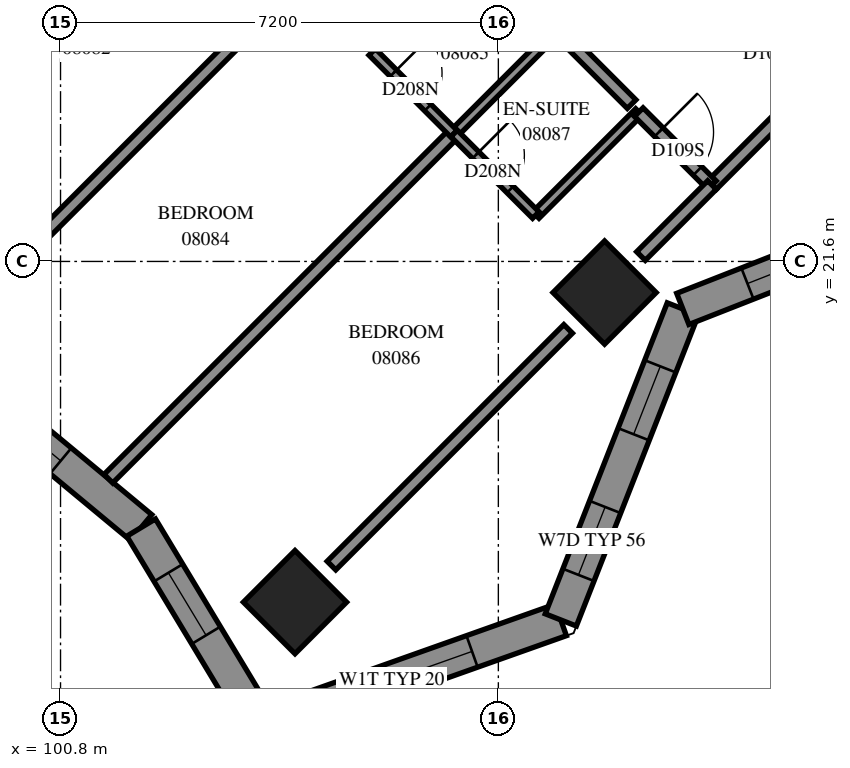
"""IFC4 building model, lengths in metres.
Left out: names, types, materials, properties, quantities, classifications, styles, units other than length and angle.
Written with IfcOpenShell. Run it as: python <this file> out.ifc"""

import sys

from ifc_helpers import new_model, si_unit, direction, frame, frame_2d, origin, origin_2d, place, context, subcontext, project, spatial, polyline, rectangle, outline, extrude, element, fill, save


model = new_model("IFC4")
c1 = context("Model", 3, precision=1e-05, world=origin(), true_north=direction((0.0, 1.0)))
c2 = subcontext(c1, "Body", "Model", "MODEL_VIEW")
j1 = project(units=[si_unit("LENGTHUNIT", "METRE"), si_unit("PLANEANGLEUNIT", "RADIAN")], contexts=[c1])
p1 = place(None, origin())
s1 = spatial("IfcSite", under=j1, at=p1, CompositionType="ELEMENT")
p2 = place(p1, origin())
s2 = spatial("IfcBuilding", under=s1, at=p2, CompositionType="ELEMENT")
p3 = place(p2, frame((0.0, 0.0, 33.8)))
s3 = spatial("IfcBuildingStorey", under=s2, at=p3, CompositionType="ELEMENT", Elevation=33.8)
for number, where, z_axis, x_axis in (
    (1, (109.747, 21.088, 0.0), (0.0, 0.0, 1.0), (0.707, -0.707, 0.0)),
    (2, (104.656, 15.997, 0.0), (0.0, 0.0, 1.0), (0.707, -0.707, 0.0)),
):
    element("IfcColumn", number, at=place(p3, frame(where, z_axis=z_axis, x_axis=x_axis)), inside=s3, PredefinedType="COLUMN", context=c2, shape_type="SweptSolid", body=[
        extrude(rectangle(XDim=1.2, YDim=1.2, at=origin_2d()), origin(), (0.0, 0.0, 1.0), 3.1),
    ])
p4 = place(p3, frame((104.096, 13.955, 0.0), z_axis=(0.0, 0.0, 1.0), x_axis=(0.9424205564, 0.3344301046, 0.0)))
e3 = element("IfcWall", 3, at=p4, inside=s3, PredefinedType="SOLIDWALL", context=c2, shape_type="SweptSolid", body=[
    extrude(outline(polyline([(-0.225, -0.275), (5.358, -0.275), (5.107, 0.275), (0.225, 0.275), (-0.225, -0.275)])), origin(), (0.0, 0.0, 1.0), 3.1),
])
p5 = place(p4, frame((0.884, 0.0, 0.5)))
e4 = element("IfcOpeningElement", 4, at=p5, cuts=e3, PredefinedType="OPENING", context=c2, shape_type="SweptSolid", body=[
    extrude(rectangle(XDim=2.8, YDim=2.45, at=frame_2d((1.4, 1.225))), frame((0.0, 0.285, 0.0), z_axis=(0.0, -1.0, 0.0), x_axis=(1.0, 0.0, 0.0)), (0.0, 0.0, 1.0), 0.57),
])
p6 = place(p3, frame((109.027, 15.705, 0.0), z_axis=(0.0, 0.0, 1.0), x_axis=(0.3651939331, 0.9309314643, 0.0)))
e5 = element("IfcWall", 5, at=p6, inside=s3, PredefinedType="SOLIDWALL", context=c2, shape_type="SweptSolid", body=[
    extrude(outline(polyline([(-0.125, -0.275), (5.374, -0.275), (5.614, 0.275), (0.125, 0.275), (-0.125, -0.275)])), origin(), (0.0, 0.0, 1.0), 3.1),
])
p7 = place(p6, frame((0.795, 0.0, 0.5)))
e6 = element("IfcOpeningElement", 6, at=p7, cuts=e5, PredefinedType="OPENING", context=c2, shape_type="SweptSolid", body=[
    extrude(rectangle(XDim=1.2, YDim=2.45, at=frame_2d((0.6, 1.225))), frame((0.0, 0.285, 0.0), z_axis=(0.0, -1.0, 0.0), x_axis=(1.0, 0.0, 0.0)), (0.0, 0.0, 1.0), 0.57),
])
p8 = place(p6, frame((3.28, 0.0, 0.5)))
e7 = element("IfcOpeningElement", 7, at=p8, cuts=e5, PredefinedType="OPENING", context=c2, shape_type="SweptSolid", body=[
    extrude(rectangle(XDim=1.2, YDim=2.45, at=frame_2d((0.6, 1.225))), frame((0.0, 0.285, 0.0), z_axis=(0.0, -1.0, 0.0), x_axis=(1.0, 0.0, 0.0)), (0.0, 0.0, 1.0), 0.57),
])
p9 = place(p3, frame((111.034, 20.819, 0.0), z_axis=(0.0, 0.0, 1.0), x_axis=(0.9309376522, 0.3651781589, 0.0)))
e8 = element("IfcWall", 8, at=p9, inside=s3, PredefinedType="SOLIDWALL", context=c2, shape_type="SweptSolid", body=[
    extrude(outline(polyline([(0.12, -0.275), (5.62, -0.275), (5.369, 0.275), (-0.12, 0.275), (0.12, -0.275)])), origin(), (0.0, 0.0, 1.0), 3.1),
])
p10 = place(p9, frame((1.142, 0.0, 0.5)))
e9 = element("IfcOpeningElement", 9, at=p10, cuts=e8, PredefinedType="OPENING", context=c2, shape_type="SweptSolid", body=[
    extrude(rectangle(XDim=2.8, YDim=2.45, at=frame_2d((1.4, 1.225))), frame((0.0, 0.285, 0.0), z_axis=(0.0, -1.0, 0.0), x_axis=(1.0, 0.0, 0.0)), (0.0, 0.0, 1.0), 0.57),
])
p11 = place(p3, frame((99.112, 19.724, 0.0), z_axis=(0.0, 0.0, 1.0), x_axis=(0.7696116293, -0.6385122866, 0.0)))
e10 = element("IfcWall", 10, at=p11, inside=s3, PredefinedType="SOLIDWALL", context=c2, shape_type="SweptSolid", body=[
    extrude(outline(polyline([(-0.026, -0.275), (3.869, -0.275), (3.962, 0.275), (0.026, 0.275), (-0.026, -0.275)])), origin(), (0.0, 0.0, 1.0), 3.1),
])
p12 = place(p11, frame((0.997, 0.0, 0.5)))
e11 = element("IfcOpeningElement", 11, at=p12, cuts=e10, PredefinedType="OPENING", context=c2, shape_type="SweptSolid", body=[
    extrude(rectangle(XDim=1.2, YDim=2.45, at=frame_2d((0.6, 1.225))), frame((0.0, 0.285, 0.0), z_axis=(0.0, -1.0, 0.0), x_axis=(1.0, 0.0, 0.0)), (0.0, 0.0, 1.0), 0.57),
])
p13 = place(p3, frame((102.125, 17.224, 0.0), z_axis=(0.0, 0.0, 1.0), x_axis=(0.5162476894, -0.8564393284, 0.0)))
e12 = element("IfcWall", 12, at=p13, inside=s3, PredefinedType="SOLIDWALL", context=c2, shape_type="SweptSolid", body=[
    extrude(outline(polyline([(0.047, -0.275), (4.042, -0.275), (3.592, 0.275), (-0.047, 0.275), (0.047, -0.275)])), origin(), (0.0, 0.0, 1.0), 3.1),
])
p14 = place(p13, frame((0.869, 0.0, 0.5)))
e13 = element("IfcOpeningElement", 13, at=p14, cuts=e12, PredefinedType="OPENING", context=c2, shape_type="SweptSolid", body=[
    extrude(rectangle(XDim=1.2, YDim=2.45, at=frame_2d((0.6, 1.225))), frame((0.0, 0.285, 0.0), z_axis=(0.0, -1.0, 0.0), x_axis=(1.0, 0.0, 0.0)), (0.0, 0.0, 1.0), 0.57),
])
p15 = place(p3, frame((102.609, 31.769, 0.0), z_axis=(0.0, 0.0, 1.0), x_axis=(0.7071067812, -0.7071067812, 0.0)))
e14 = element("IfcWall", 14, at=p15, inside=s3, PredefinedType="PARTITIONING", context=c2, shape_type="SweptSolid", body=[
    extrude(rectangle(XDim=10.723, YDim=0.2, at=frame_2d((5.361, 0.0))), origin(), (0.0, 0.0, 1.0), 3.1),
])
p16 = place(p15, frame((4.15, 0.0, 0.0)))
e15 = element("IfcOpeningElement", 15, at=p16, cuts=e14, PredefinedType="OPENING", context=c2, shape_type="SweptSolid", body=[
    extrude(rectangle(XDim=0.9, YDim=2.1, at=frame_2d((0.45, 1.05))), frame((0.0, 0.11, 0.0), z_axis=(0.0, -1.0, 0.0), x_axis=(1.0, 0.0, 0.0)), (0.0, 0.0, 1.0), 0.22),
])
p17 = place(p15, frame((5.8, 0.0, 0.0)))
e16 = element("IfcOpeningElement", 16, at=p17, cuts=e14, PredefinedType="OPENING", context=c2, shape_type="SweptSolid", body=[
    extrude(rectangle(XDim=0.9, YDim=2.1, at=frame_2d((0.45, 1.05))), frame((0.0, 0.11, 0.0), z_axis=(0.0, -1.0, 0.0), x_axis=(1.0, 0.0, 0.0)), (0.0, 0.0, 1.0), 0.22),
])
p18 = place(p3, frame((101.587, 18.028, 0.0), z_axis=(0.0, 0.0, 1.0), x_axis=(0.7072374716, 0.7069760666, 0.0)))
e17 = element("IfcWall", 17, at=p18, inside=s3, PredefinedType="PARTITIONING", context=c2, shape_type="SweptSolid", body=[
    extrude(rectangle(XDim=8.034, YDim=0.2, at=frame_2d((4.017, 0.0))), origin(), (0.0, 0.0, 1.0), 3.1),
])
p19 = place(p3, frame((96.536, 23.152, 0.0), z_axis=(0.0, 0.0, 1.0), x_axis=(0.7071067812, 0.7071067812, 0.0)))
e18 = element("IfcWall", 18, at=p19, inside=s3, PredefinedType="PARTITIONING", context=c2, shape_type="SweptSolid", body=[
    extrude(rectangle(XDim=7.983, YDim=0.2, at=frame_2d((3.991, 0.0))), origin(), (0.0, 0.0, 1.0), 3.1),
])
p20 = place(p3, frame((107.977, 29.499, 0.0), z_axis=(0.0, 0.0, 1.0), x_axis=(0.7071067812, -0.7071067812, 0.0)))
e19 = element("IfcWall", 19, at=p20, inside=s3, PredefinedType="PARTITIONING", context=c2, shape_type="SweptSolid", body=[
    extrude(rectangle(XDim=7.198, YDim=0.2, at=frame_2d((3.599, 0.0))), origin(), (0.0, 0.0, 1.0), 3.1),
])
p21 = place(p20, frame((0.247, 0.0, 0.0)))
e20 = element("IfcOpeningElement", 20, at=p21, cuts=e19, PredefinedType="OPENING", context=c2, shape_type="SweptSolid", body=[
    extrude(rectangle(XDim=0.9, YDim=2.1, at=frame_2d((0.45, 1.05))), frame((0.0, 0.11, 0.0), z_axis=(0.0, -1.0, 0.0), x_axis=(1.0, 0.0, 0.0)), (0.0, 0.0, 1.0), 0.22),
])
p22 = place(p20, frame((5.899, 0.0, 0.0)))
e21 = element("IfcOpeningElement", 21, at=p22, cuts=e19, PredefinedType="OPENING", context=c2, shape_type="SweptSolid", body=[
    extrude(rectangle(XDim=0.9, YDim=2.1, at=frame_2d((0.45, 1.05))), frame((0.0, 0.11, 0.0), z_axis=(0.0, -1.0, 0.0), x_axis=(1.0, 0.0, 0.0)), (0.0, 0.0, 1.0), 0.22),
])
p23 = place(p3, frame((105.255, 16.599, 0.0), z_axis=(0.0, 0.0, 1.0), x_axis=(0.7071067812, 0.7071067812, 0.0)))
e22 = element("IfcWall", 22, at=p23, inside=s3, PredefinedType="PARTITIONING", context=c2, shape_type="SweptSolid", body=[
    extrude(rectangle(XDim=5.504, YDim=0.2, at=frame_2d((2.752, 0.0))), origin(), (0.0, 0.0, 1.0), 2.6),
])
p24 = place(p3, frame((100.163, 21.689, 0.0), z_axis=(0.0, 0.0, 1.0), x_axis=(0.7071067812, 0.7071067812, 0.0)))
e23 = element("IfcWall", 23, at=p24, inside=s3, PredefinedType="PARTITIONING", context=c2, shape_type="SweptSolid", body=[
    extrude(rectangle(XDim=5.504, YDim=0.2, at=frame_2d((2.752, 0.0))), origin(), (0.0, 0.0, 1.0), 3.1),
])
for number, where, z_axis, x_axis in (
    (24, (105.927, 25.049, 0.0), (0.0, 0.0, 1.0), (0.707, 0.707, 0.0)),
    (25, (107.271, 23.705, 0.0), (0.0, 0.0, 1.0), (0.707, 0.707, 0.0)),
):
    element("IfcWall", number, at=place(p3, frame(where, z_axis=z_axis, x_axis=x_axis)), inside=s3, PredefinedType="PARTITIONING", context=c2, shape_type="SweptSolid", body=[
        extrude(rectangle(XDim=2.401, YDim=0.15, at=frame_2d((1.201, 0.0))), origin(), (0.0, 0.0, 1.0), 3.1),
    ])
p25 = place(p3, frame((108.615, 22.363, 0.0), z_axis=(0.0, 0.0, 1.0), x_axis=(0.7071067812, 0.7071067812, 0.0)))
e26 = element("IfcWall", 26, at=p25, inside=s3, PredefinedType="PARTITIONING", context=c2, shape_type="SweptSolid", body=[
    extrude(rectangle(XDim=2.398, YDim=0.15, at=frame_2d((1.199, 0.0))), origin(), (0.0, 0.0, 1.0), 3.1),
])
p26 = place(p3, frame((111.513, 22.857, 0.0), z_axis=(0.0, 0.0, 1.0), x_axis=(0.7071067812, 0.7071067812, 0.0)))
e27 = element("IfcWall", 27, at=p26, inside=s3, PredefinedType="PARTITIONING", context=c2, shape_type="SweptSolid", body=[
    extrude(rectangle(XDim=2.2, YDim=0.2, at=frame_2d((1.1, 0.0))), origin(), (0.0, 0.0, 1.0), 2.6),
])
p27 = place(p3, frame((105.925, 25.045, 0.0), z_axis=(0.0, 0.0, 1.0), x_axis=(0.7071067812, -0.7071067812, 0.0)))
e28 = element("IfcWall", 28, at=p27, inside=s3, PredefinedType="PARTITIONING", context=c2, shape_type="SweptSolid", body=[
    extrude(rectangle(XDim=1.901, YDim=0.15, at=frame_2d((0.95, 0.0))), origin(), (0.0, 0.0, 1.0), 3.1),
])
p28 = place(p27, frame((0.493, 0.0, 0.0)))
e29 = element("IfcOpeningElement", 29, at=p28, cuts=e28, PredefinedType="OPENING", context=c2, shape_type="SweptSolid", body=[
    extrude(rectangle(XDim=0.8, YDim=2.1, at=frame_2d((0.4, 1.05))), frame((0.0, 0.085, 0.0), z_axis=(0.0, -1.0, 0.0), x_axis=(1.0, 0.0, 0.0)), (0.0, 0.0, 1.0), 0.17),
])
p29 = place(p3, frame((107.272, 23.704, 0.0), z_axis=(0.0, 0.0, 1.0), x_axis=(0.7076330979, -0.7065800724, 0.0)))
e30 = element("IfcWall", 30, at=p29, inside=s3, PredefinedType="PARTITIONING", context=c2, shape_type="SweptSolid", body=[
    extrude(rectangle(XDim=1.899, YDim=0.15, at=frame_2d((0.95, 0.0))), origin(), (0.0, 0.0, 1.0), 3.1),
])
p30 = place(p29, frame((0.503, 0.0, 0.0)))
e31 = element("IfcOpeningElement", 31, at=p30, cuts=e30, PredefinedType="OPENING", context=c2, shape_type="SweptSolid", body=[
    extrude(rectangle(XDim=0.8, YDim=2.1, at=frame_2d((0.4, 1.05))), frame((0.0, 0.085, 0.0), z_axis=(0.0, -1.0, 0.0), x_axis=(1.0, 0.0, 0.0)), (0.0, 0.0, 1.0), 0.17),
])
p31 = place(p3, frame((110.309, 24.055, 0.0), z_axis=(0.0, 0.0, 1.0), x_axis=(0.7071067812, -0.7071067812, 0.0)))
e32 = element("IfcWall", 32, at=p31, inside=s3, PredefinedType="PARTITIONING", context=c2, shape_type="SweptSolid", body=[
    extrude(rectangle(XDim=1.7, YDim=0.2, at=frame_2d((0.85, 0.0))), origin(), (0.0, 0.0, 1.0), 3.1),
])
p32 = place(p31, frame((0.467, 0.0, 0.0)))
e33 = element("IfcOpeningElement", 33, at=p32, cuts=e32, PredefinedType="OPENING", context=c2, shape_type="SweptSolid", body=[
    extrude(rectangle(XDim=0.9, YDim=2.1, at=frame_2d((0.45, 1.05))), frame((0.0, 0.11, 0.0), z_axis=(0.0, -1.0, 0.0), x_axis=(1.0, 0.0, 0.0)), (0.0, 0.0, 1.0), 0.22),
])
p33 = place(p3, frame((110.346, 21.689, 0.0), z_axis=(0.0, 0.0, 1.0), x_axis=(0.7071067812, 0.7071067812, 0.0)))
e34 = element("IfcWall", 34, at=p33, inside=s3, PredefinedType="PARTITIONING", context=c2, shape_type="SweptSolid", body=[
    extrude(rectangle(XDim=1.652, YDim=0.2, at=frame_2d((0.826, 0.0))), origin(), (0.0, 0.0, 1.0), 2.6),
])
p34 = place(p5, origin())
e35 = element("IfcWindow", 35, at=p34, inside=s3, PartitioningType="SINGLE_PANEL", PredefinedType="WINDOW", context=c2, shape_type="SweptSolid", body=[
    extrude(rectangle(XDim=2.8, YDim=2.45, at=frame_2d((1.4, 1.225))), frame((0.0, 0.155, 0.0), z_axis=(0.0, -1.0, 0.0), x_axis=(1.0, 0.0, 0.0)), (0.0, 0.0, 1.0), 0.06),
])
fill(e4, e35)
p35 = place(p7, origin())
e36 = element("IfcWindow", 36, at=p35, inside=s3, PartitioningType="SINGLE_PANEL", PredefinedType="WINDOW", context=c2, shape_type="SweptSolid", body=[
    extrude(rectangle(XDim=1.2, YDim=2.45, at=frame_2d((0.6, 1.225))), frame((0.0, 0.155, 0.0), z_axis=(0.0, -1.0, 0.0), x_axis=(1.0, 0.0, 0.0)), (0.0, 0.0, 1.0), 0.06),
])
fill(e6, e36)
p36 = place(p8, origin())
e37 = element("IfcWindow", 37, at=p36, inside=s3, PartitioningType="SINGLE_PANEL", PredefinedType="WINDOW", context=c2, shape_type="SweptSolid", body=[
    extrude(rectangle(XDim=1.2, YDim=2.45, at=frame_2d((0.6, 1.225))), frame((0.0, 0.155, 0.0), z_axis=(0.0, -1.0, 0.0), x_axis=(1.0, 0.0, 0.0)), (0.0, 0.0, 1.0), 0.06),
])
fill(e7, e37)
p37 = place(p10, origin())
e38 = element("IfcWindow", 38, at=p37, inside=s3, PartitioningType="SINGLE_PANEL", PredefinedType="WINDOW", context=c2, shape_type="SweptSolid", body=[
    extrude(rectangle(XDim=2.8, YDim=2.45, at=frame_2d((1.4, 1.225))), frame((0.0, 0.155, 0.0), z_axis=(0.0, -1.0, 0.0), x_axis=(1.0, 0.0, 0.0)), (0.0, 0.0, 1.0), 0.06),
])
fill(e9, e38)
p38 = place(p12, origin())
e39 = element("IfcWindow", 39, at=p38, inside=s3, PartitioningType="SINGLE_PANEL", PredefinedType="WINDOW", context=c2, shape_type="SweptSolid", body=[
    extrude(rectangle(XDim=1.2, YDim=2.45, at=frame_2d((0.6, 1.225))), frame((0.0, 0.155, 0.0), z_axis=(0.0, -1.0, 0.0), x_axis=(1.0, 0.0, 0.0)), (0.0, 0.0, 1.0), 0.06),
])
fill(e11, e39)
p39 = place(p14, origin())
e40 = element("IfcWindow", 40, at=p39, inside=s3, PartitioningType="SINGLE_PANEL", PredefinedType="WINDOW", context=c2, shape_type="SweptSolid", body=[
    extrude(rectangle(XDim=1.2, YDim=2.45, at=frame_2d((0.6, 1.225))), frame((0.0, 0.155, 0.0), z_axis=(0.0, -1.0, 0.0), x_axis=(1.0, 0.0, 0.0)), (0.0, 0.0, 1.0), 0.06),
])
fill(e13, e40)
p40 = place(p28, origin())
e41 = element("IfcDoor", 41, at=p40, inside=s3, OperationType="SINGLE_SWING_RIGHT", PredefinedType="DOOR", context=c2, shape_type="SweptSolid", body=[
    extrude(rectangle(XDim=0.8, YDim=2.1, at=frame_2d((0.4, 1.05))), frame((0.0, 0.025, 0.0), z_axis=(0.0, -1.0, 0.0), x_axis=(1.0, 0.0, 0.0)), (0.0, 0.0, 1.0), 0.05),
])
fill(e29, e41)
p41 = place(p32, origin())
e42 = element("IfcDoor", 42, at=p41, inside=s3, OperationType="SINGLE_SWING_LEFT", PredefinedType="DOOR", context=c2, shape_type="SweptSolid", body=[
    extrude(rectangle(XDim=0.9, YDim=2.1, at=frame_2d((0.45, 1.05))), frame((0.0, 0.025, 0.0), z_axis=(0.0, -1.0, 0.0), x_axis=(1.0, 0.0, 0.0)), (0.0, 0.0, 1.0), 0.05),
])
fill(e33, e42)
p42 = place(p30, origin())
e43 = element("IfcDoor", 43, at=p42, inside=s3, OperationType="SINGLE_SWING_RIGHT", PredefinedType="DOOR", context=c2, shape_type="SweptSolid", body=[
    extrude(rectangle(XDim=0.8, YDim=2.1, at=frame_2d((0.4, 1.05))), frame((0.0, 0.025, 0.0), z_axis=(0.0, -1.0, 0.0), x_axis=(1.0, 0.0, 0.0)), (0.0, 0.0, 1.0), 0.05),
])
fill(e31, e43)
p43 = place(p22, origin())
e44 = element("IfcDoor", 44, at=p43, inside=s3, OperationType="SINGLE_SWING_RIGHT", PredefinedType="DOOR", context=c2, shape_type="SweptSolid", body=[
    extrude(rectangle(XDim=0.9, YDim=2.1, at=frame_2d((0.45, 1.05))), frame((0.0, 0.025, 0.0), z_axis=(0.0, -1.0, 0.0), x_axis=(1.0, 0.0, 0.0)), (0.0, 0.0, 1.0), 0.05),
])
fill(e21, e44)
save(model, sys.argv[1])
